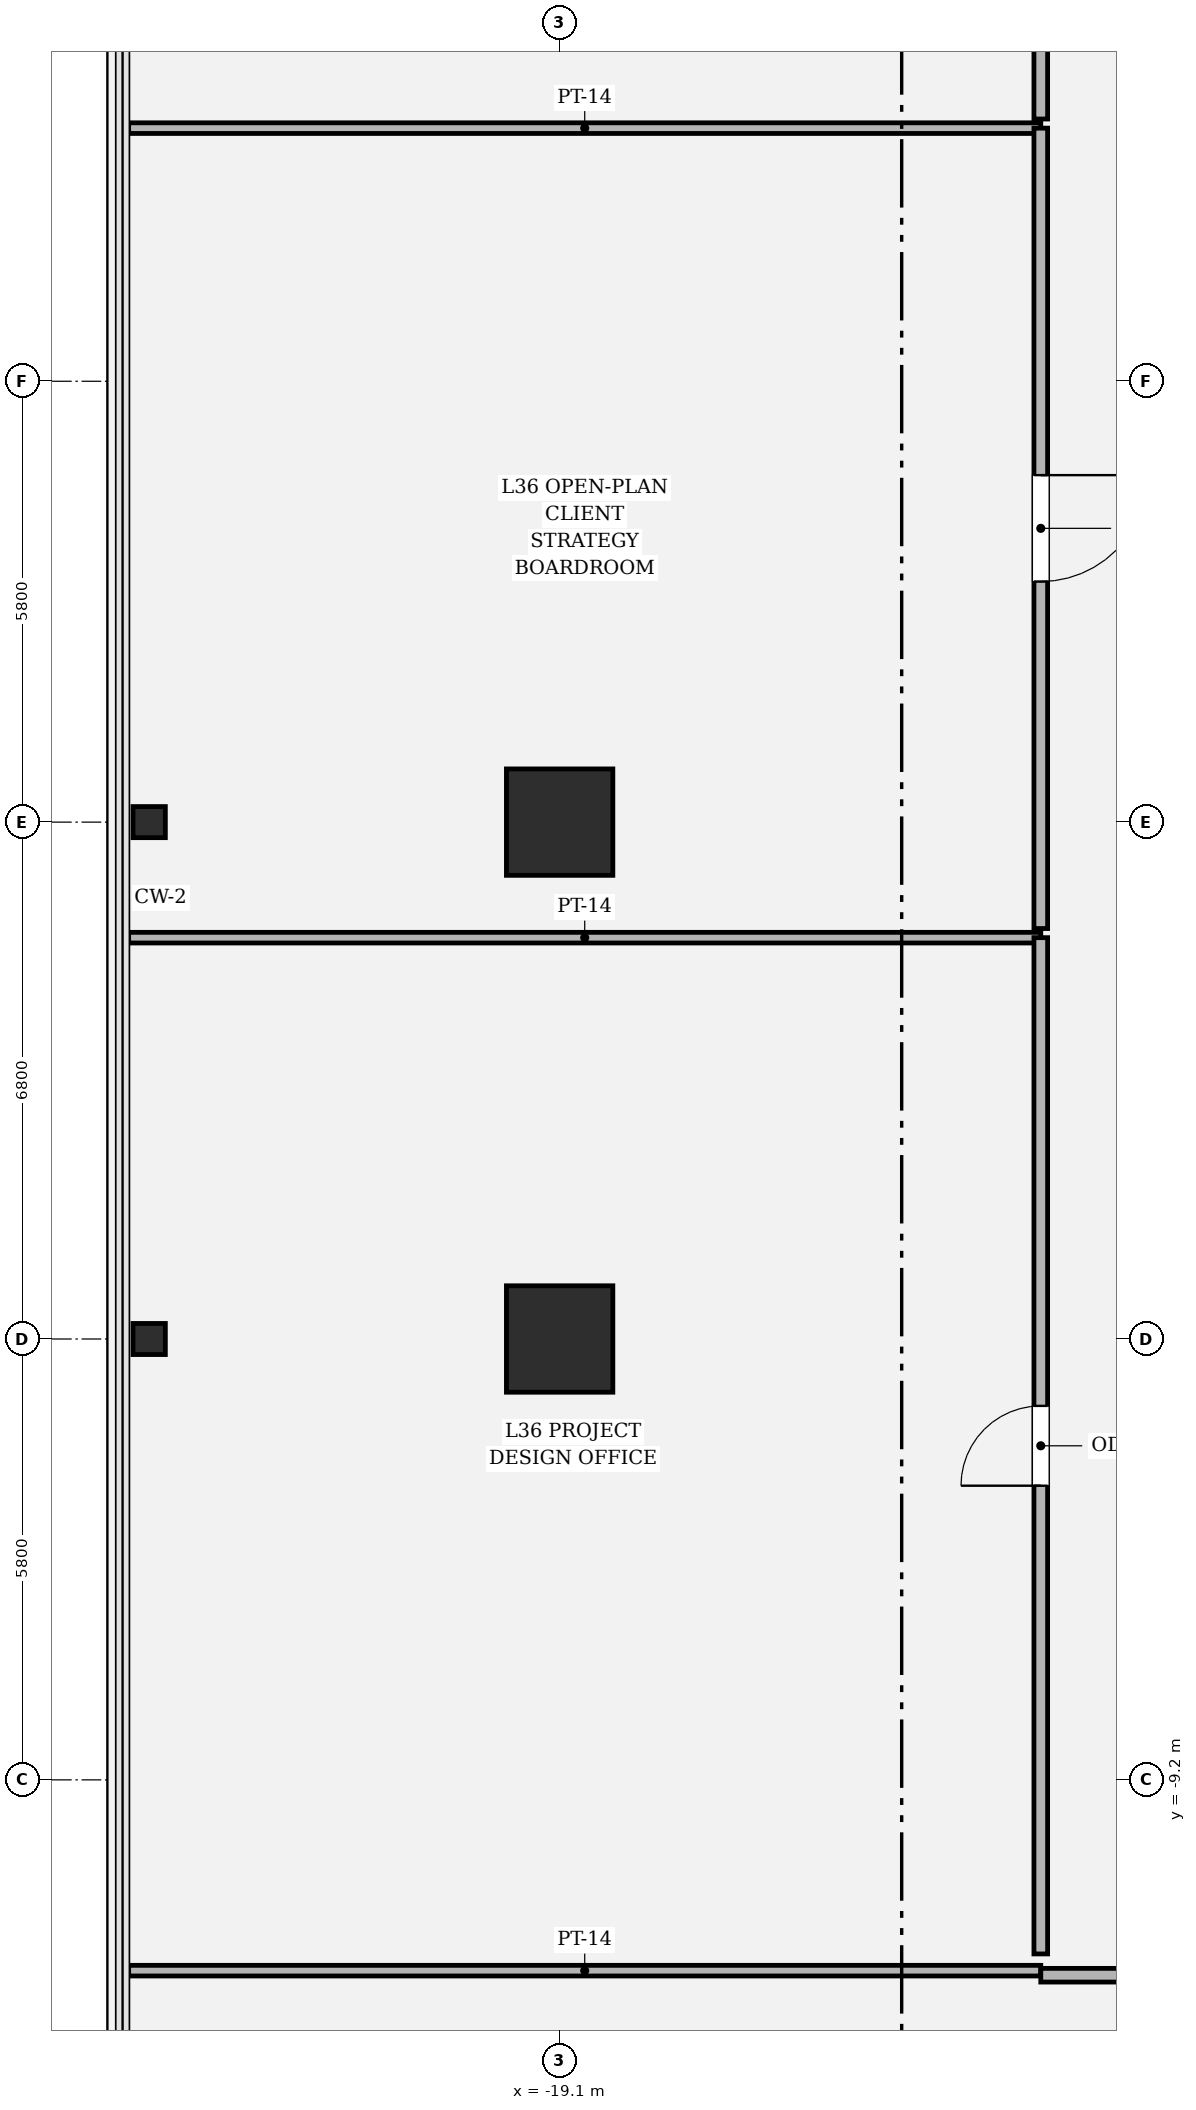
"""IFC4 building model, lengths in metres.
Left out: names, types, materials, properties, quantities, classifications, styles, units other than length and angle.
Written with IfcOpenShell. Run it as: python <this file> out.ifc"""

import sys

from ifc_helpers import new_model, si_unit, direction, frame, frame_2d, origin, origin_2d, place, context, subcontext, project, spatial, rectangle, hollow_rectangle, i_section, extrude, element, fill, save


model = new_model("IFC4")
c1 = context("Model", 3, precision=1e-05, world=origin(), true_north=direction((0.0, 1.0)))
c2 = subcontext(c1, "Body", "Model", "MODEL_VIEW")
j1 = project(units=[si_unit("LENGTHUNIT", "METRE"), si_unit("PLANEANGLEUNIT", "RADIAN")], contexts=[c1])
p1 = place(None, origin())
s1 = spatial("IfcSite", under=j1, at=p1, CompositionType="ELEMENT")
p2 = place(p1, origin())
s2 = spatial("IfcBuilding", under=s1, at=p2, CompositionType="ELEMENT")
p3 = place(p2, frame((0.0, 0.0, 156.0)))
s3 = spatial("IfcBuildingStorey", under=s2, at=p3, CompositionType="ELEMENT", Elevation=156.0)
for number, where, z_axis, x_axis in (
    (1, (-19.1, 3.4, 0.0), (0.0, 0.0, 1.0), (1.0, 0.0, 0.0)),
    (2, (-19.1, -3.4, 0.0), (0.0, 0.0, 1.0), (1.0, 0.0, 0.0)),
):
    element("IfcColumn", number, at=place(p3, frame(where, z_axis=z_axis, x_axis=x_axis)), inside=s3, PredefinedType="COLUMN", context=c2, shape_type="SweptSolid", body=[
        extrude(hollow_rectangle(XDim=1.4, YDim=1.4, WallThickness=0.042, at=origin_2d()), origin(), (0.0, 0.0, 1.0), 4.05),
    ])
for number, where, z_axis, x_axis in (
    (3, (-24.5, -3.4, 0.0), (0.0, 0.0, 1.0), (0.0, 1.0, 0.0)),
    (4, (-24.5, 3.4, 0.0), (0.0, 0.0, 1.0), (0.0, 1.0, 0.0)),
):
    element("IfcColumn", number, at=place(p3, frame(where, z_axis=z_axis, x_axis=x_axis)), inside=s3, PredefinedType="COLUMN", context=c2, shape_type="SweptSolid", body=[
        extrude(i_section(OverallWidth=0.409, OverallDepth=0.425, WebThickness=0.032, FlangeThickness=0.052, FilletRadius=0.018, at=origin_2d()), origin(), (0.0, 0.0, 1.0), 4.048),
    ])
p4 = place(p3, frame((-24.77, -11.71, 0.0), z_axis=(0.0, 0.0, 1.0), x_axis=(1.0, 0.0, 0.0)))
e5 = element("IfcWall", 5, at=p4, inside=s3, PredefinedType="PARTITIONING", context=c2, shape_type="SweptSolid", body=[
    extrude(rectangle(XDim=12.0, YDim=0.14, at=frame_2d((6.0, 0.0))), origin(), (0.0, 0.0, 1.0), 2.544),
])
p5 = place(p3, frame((-12.77, -11.77, 0.0), z_axis=(0.0, 0.0, 1.0), x_axis=(1.0, 0.0, 0.0)))
e6 = element("IfcWall", 6, at=p5, inside=s3, PredefinedType="PARTITIONING", context=c2, shape_type="SweptSolid", body=[
    extrude(rectangle(XDim=25.54, YDim=0.18, at=frame_2d((12.77, 0.0))), origin(), (0.0, 0.0, 1.0), 3.174),
])
p6 = place(p5, frame((12.245, 0.0, 0.0)))
e7 = element("IfcOpeningElement", 7, at=p6, cuts=e6, PredefinedType="OPENING", context=c2, shape_type="SweptSolid", body=[
    extrude(rectangle(XDim=1.05, YDim=2.2, at=frame_2d((0.525, 1.1))), frame((0.0, 0.1, 0.0), z_axis=(0.0, -1.0, 0.0), x_axis=(1.0, 0.0, 0.0)), (0.0, 0.0, 1.0), 0.2),
])
p7 = place(p3, frame((-24.77, 1.88, 0.0), z_axis=(0.0, 0.0, 1.0), x_axis=(1.0, 0.0, 0.0)))
e8 = element("IfcWall", 8, at=p7, inside=s3, PredefinedType="PARTITIONING", context=c2, shape_type="SweptSolid", body=[
    extrude(rectangle(XDim=12.0, YDim=0.14, at=frame_2d((6.0, 0.0))), origin(), (0.0, 0.0, 1.0), 2.544),
])
p8 = place(p3, frame((-12.77, 1.88, 0.0), z_axis=(0.0, 0.0, 1.0), x_axis=(0.0, -1.0, 0.0)))
e9 = element("IfcWall", 9, at=p8, inside=s3, PredefinedType="PARTITIONING", context=c2, shape_type="SweptSolid", body=[
    extrude(rectangle(XDim=13.37, YDim=0.18, at=frame_2d((6.685, 0.0))), origin(), (0.0, 0.0, 1.0), 3.174),
])
p9 = place(p8, frame((6.16, 0.0, 0.0)))
e10 = element("IfcOpeningElement", 10, at=p9, cuts=e9, PredefinedType="OPENING", context=c2, shape_type="SweptSolid", body=[
    extrude(rectangle(XDim=1.05, YDim=2.2, at=frame_2d((0.525, 1.1))), frame((0.0, 0.1, 0.0), z_axis=(0.0, -1.0, 0.0), x_axis=(1.0, 0.0, 0.0)), (0.0, 0.0, 1.0), 0.2),
])
p10 = place(p3, frame((-24.77, 12.53, 0.0), z_axis=(0.0, 0.0, 1.0), x_axis=(1.0, 0.0, 0.0)))
e11 = element("IfcWall", 11, at=p10, inside=s3, PredefinedType="PARTITIONING", context=c2, shape_type="SweptSolid", body=[
    extrude(rectangle(XDim=12.0, YDim=0.14, at=frame_2d((6.0, 0.0))), origin(), (0.0, 0.0, 1.0), 2.544),
])
p11 = place(p3, frame((-12.77, 12.53, 0.0), z_axis=(0.0, 0.0, 1.0), x_axis=(0.0, -1.0, 0.0)))
e12 = element("IfcWall", 12, at=p11, inside=s3, PredefinedType="PARTITIONING", context=c2, shape_type="SweptSolid", body=[
    extrude(rectangle(XDim=10.53, YDim=0.18, at=frame_2d((5.265, 0.0))), origin(), (0.0, 0.0, 1.0), 3.174),
])
p12 = place(p11, frame((4.565, 0.0, 0.0)))
e13 = element("IfcOpeningElement", 13, at=p12, cuts=e12, PredefinedType="OPENING", context=c2, shape_type="SweptSolid", body=[
    extrude(rectangle(XDim=1.4, YDim=2.25, at=frame_2d((0.7, 1.125))), frame((0.0, 0.1, 0.0), z_axis=(0.0, -1.0, 0.0), x_axis=(1.0, 0.0, 0.0)), (0.0, 0.0, 1.0), 0.2),
])
p13 = place(p3, frame((-12.77, 23.17, 0.0), z_axis=(0.0, 0.0, 1.0), x_axis=(0.0, -1.0, 0.0)))
e14 = element("IfcWall", 14, at=p13, inside=s3, PredefinedType="PARTITIONING", context=c2, shape_type="SweptSolid", body=[
    extrude(rectangle(XDim=10.52, YDim=0.18, at=frame_2d((5.26, 0.0))), origin(), (0.0, 0.0, 1.0), 2.544),
])
p14 = place(p13, frame((4.735, 0.0, 0.0)))
e15 = element("IfcOpeningElement", 15, at=p14, cuts=e14, PredefinedType="OPENING", context=c2, shape_type="SweptSolid", body=[
    extrude(rectangle(XDim=1.05, YDim=2.2, at=frame_2d((0.525, 1.1))), frame((0.0, 0.1, 0.0), z_axis=(0.0, -1.0, 0.0), x_axis=(1.0, 0.0, 0.0)), (0.0, 0.0, 1.0), 0.2),
])
p15 = place(p9, origin())
e16 = element("IfcDoor", 16, at=p15, inside=s3, OperationType="SINGLE_SWING_RIGHT", PredefinedType="DOOR", context=c2, shape_type="SweptSolid", body=[
    extrude(rectangle(XDim=1.05, YDim=2.2, at=frame_2d((0.525, 1.1))), frame((0.0, 0.025, 0.0), z_axis=(0.0, -1.0, 0.0), x_axis=(1.0, 0.0, 0.0)), (0.0, 0.0, 1.0), 0.05),
])
fill(e10, e16)
p16 = place(p12, origin())
e17 = element("IfcDoor", 17, at=p16, inside=s3, OperationType="SINGLE_SWING_LEFT", PredefinedType="DOOR", context=c2, shape_type="SweptSolid", body=[
    extrude(rectangle(XDim=1.4, YDim=2.25, at=frame_2d((0.7, 1.125))), frame((0.0, 0.025, 0.0), z_axis=(0.0, -1.0, 0.0), x_axis=(1.0, 0.0, 0.0)), (0.0, 0.0, 1.0), 0.05),
])
fill(e13, e17)
save(model, sys.argv[1])
